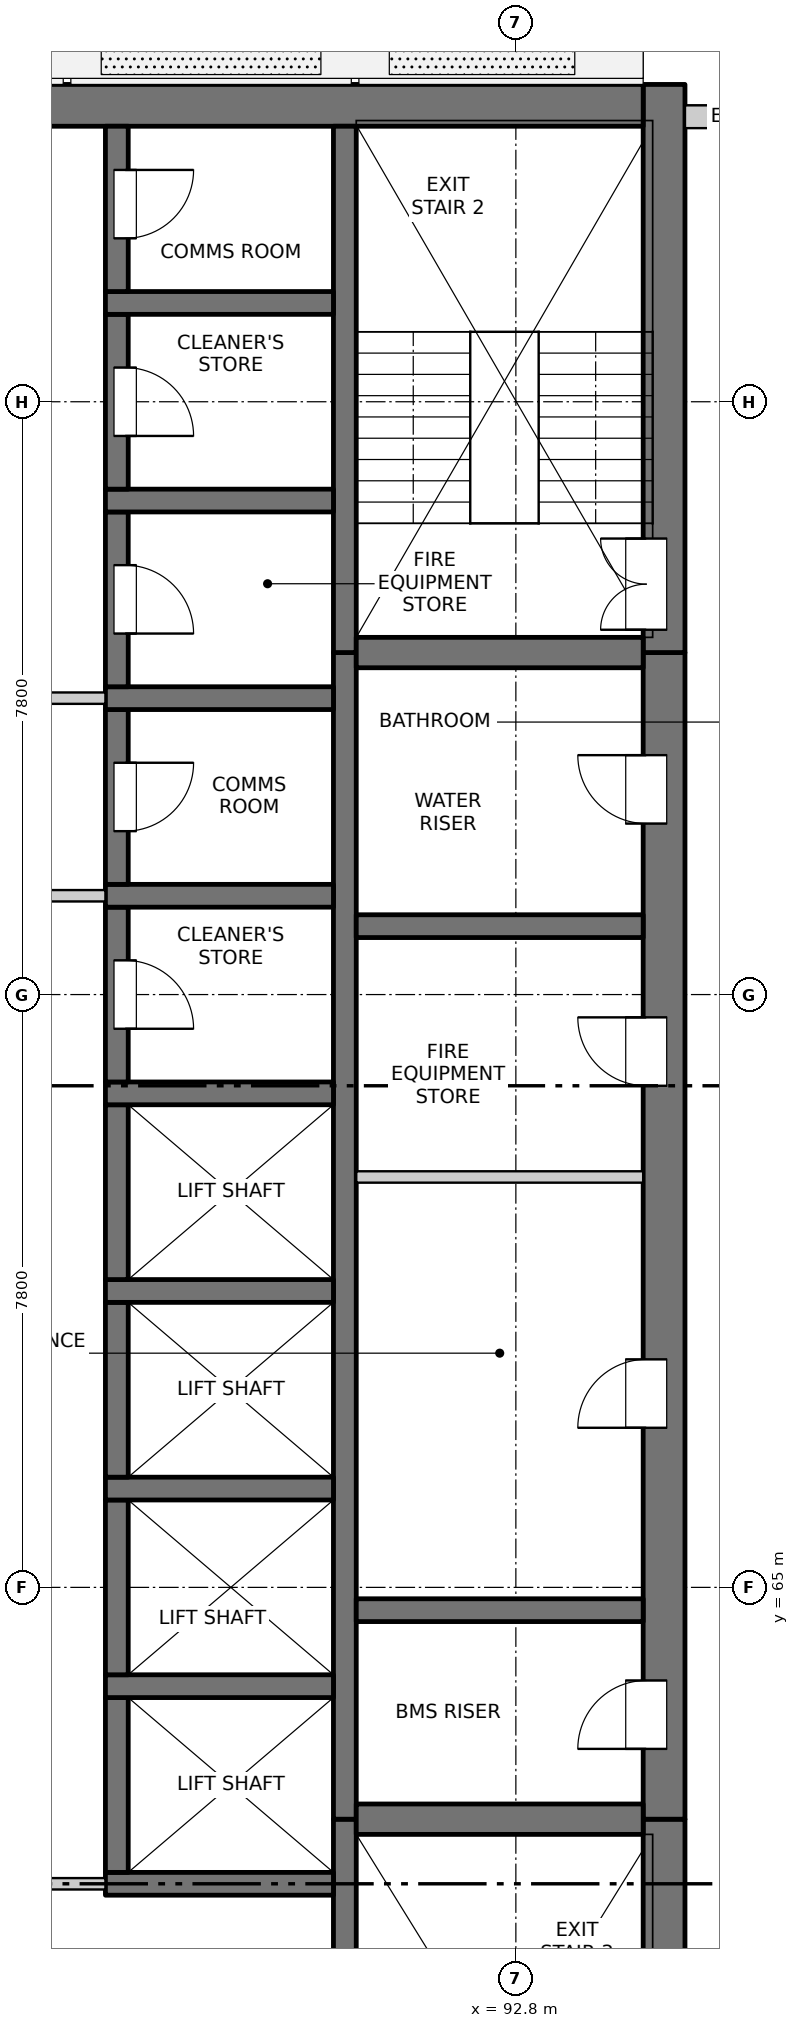
"""IFC4 building model, lengths in metres.
Left out: names, types, materials, properties, quantities, classifications, styles, units other than length and angle.
Written with IfcOpenShell. Run it as: python <this file> out.ifc"""

import sys

from ifc_helpers import new_model, si_unit, direction, frame, frame_2d, origin, place, context, subcontext, project, spatial, rectangle, extrude, element, fill, save


model = new_model("IFC4")
c1 = context("Model", 3, precision=1e-05, world=origin(), true_north=direction((0.0, 1.0)))
c2 = subcontext(c1, "Body", "Model", "MODEL_VIEW")
j1 = project(units=[si_unit("LENGTHUNIT", "METRE"), si_unit("PLANEANGLEUNIT", "RADIAN")], contexts=[c1])
p1 = place(None, origin())
s1 = spatial("IfcSite", under=j1, at=p1, CompositionType="ELEMENT")
p2 = place(p1, origin())
s2 = spatial("IfcBuilding", under=s1, at=p2, CompositionType="ELEMENT")
p3 = place(p2, frame((0.0, 0.0, 99.9)))
s3 = spatial("IfcBuildingStorey", under=s2, at=p3, CompositionType="ELEMENT", Elevation=99.9)
p4 = place(p3, frame((94.75, 54.975, -0.3), z_axis=(0.0, 0.0, 1.0), x_axis=(0.0, 1.0, 0.0)))
e1 = element("IfcWall", 1, at=p4, inside=s3, PredefinedType="SOLIDWALL", context=c2, shape_type="SweptSolid", body=[
    extrude(rectangle(XDim=6.975, YDim=0.55, at=frame_2d((3.487, 0.0))), origin(), (0.0, 0.0, 1.0), 3.45),
])
p5 = place(p4, frame((0.675, 0.0, 0.3)))
e2 = element("IfcOpeningElement", 2, at=p5, cuts=e1, PredefinedType="OPENING", context=c2, shape_type="SweptSolid", body=[
    extrude(rectangle(XDim=1.2, YDim=2.1, at=frame_2d((0.6, 1.05))), frame((0.0, 0.285, 0.0), z_axis=(0.0, -1.0, 0.0), x_axis=(1.0, 0.0, 0.0)), (0.0, 0.0, 1.0), 0.57),
])
p6 = place(p3, frame((94.75, 61.95, -0.3), z_axis=(0.0, 0.0, 1.0), x_axis=(0.0, 1.0, 0.0)))
e3 = element("IfcWall", 3, at=p6, inside=s3, PredefinedType="SOLIDWALL", context=c2, shape_type="SweptSolid", body=[
    extrude(rectangle(XDim=15.35, YDim=0.55, at=frame_2d((7.675, 0.0))), origin(), (0.0, 0.0, 1.0), 3.45),
])
p7 = place(p6, frame((0.925, 0.0, 0.3)))
e4 = element("IfcOpeningElement", 4, at=p7, cuts=e3, PredefinedType="OPENING", context=c2, shape_type="SweptSolid", body=[
    extrude(rectangle(XDim=0.9, YDim=2.1, at=frame_2d((0.45, 1.05))), frame((0.0, 0.285, 0.0), z_axis=(0.0, -1.0, 0.0), x_axis=(1.0, 0.0, 0.0)), (0.0, 0.0, 1.0), 0.57),
])
p8 = place(p6, frame((5.15, 0.0, 0.3)))
e5 = element("IfcOpeningElement", 5, at=p8, cuts=e3, PredefinedType="OPENING", context=c2, shape_type="SweptSolid", body=[
    extrude(rectangle(XDim=0.9, YDim=2.1, at=frame_2d((0.45, 1.05))), frame((0.0, 0.285, 0.0), z_axis=(0.0, -1.0, 0.0), x_axis=(1.0, 0.0, 0.0)), (0.0, 0.0, 1.0), 0.57),
])
p9 = place(p6, frame((9.65, 0.0, 0.3)))
e6 = element("IfcOpeningElement", 6, at=p9, cuts=e3, PredefinedType="OPENING", context=c2, shape_type="SweptSolid", body=[
    extrude(rectangle(XDim=0.9, YDim=2.1, at=frame_2d((0.45, 1.05))), frame((0.0, 0.285, 0.0), z_axis=(0.0, -1.0, 0.0), x_axis=(1.0, 0.0, 0.0)), (0.0, 0.0, 1.0), 0.57),
])
p10 = place(p6, frame((13.1, 0.0, 0.3)))
e7 = element("IfcOpeningElement", 7, at=p10, cuts=e3, PredefinedType="OPENING", context=c2, shape_type="SweptSolid", body=[
    extrude(rectangle(XDim=0.9, YDim=2.1, at=frame_2d((0.45, 1.05))), frame((0.0, 0.285, 0.0), z_axis=(0.0, -1.0, 0.0), x_axis=(1.0, 0.0, 0.0)), (0.0, 0.0, 1.0), 0.57),
])
p11 = place(p3, frame((94.75, 77.3, -0.3), z_axis=(0.0, 0.0, 1.0), x_axis=(0.0, 1.0, 0.0)))
e8 = element("IfcWall", 8, at=p11, inside=s3, PredefinedType="SOLIDWALL", context=c2, shape_type="SweptSolid", body=[
    extrude(rectangle(XDim=7.475, YDim=0.55, at=frame_2d((3.737, 0.0))), origin(), (0.0, 0.0, 1.0), 3.45),
])
p12 = place(p11, frame((0.3, 0.0, 0.3)))
e9 = element("IfcOpeningElement", 9, at=p12, cuts=e8, PredefinedType="OPENING", context=c2, shape_type="SweptSolid", body=[
    extrude(rectangle(XDim=1.2, YDim=2.1, at=frame_2d((0.6, 1.05))), frame((0.0, 0.285, 0.0), z_axis=(0.0, -1.0, 0.0), x_axis=(1.0, 0.0, 0.0)), (0.0, 0.0, 1.0), 0.57),
])
p13 = place(p3, frame((75.525, 84.5, -0.3), z_axis=(0.0, 0.0, 1.0), x_axis=(1.0, 0.0, 0.0)))
e10 = element("IfcWall", 10, at=p13, inside=s3, PredefinedType="SOLIDWALL", context=c2, shape_type="SweptSolid", body=[
    extrude(rectangle(XDim=18.95, YDim=0.55, at=frame_2d((9.475, 0.0))), origin(), (0.0, 0.0, 1.0), 3.45),
])
p14 = place(p3, frame((90.55, 55.525, -0.3), z_axis=(0.0, 0.0, 1.0), x_axis=(0.0, 1.0, 0.0)))
e11 = element("IfcWall", 11, at=p14, inside=s3, PredefinedType="SOLIDWALL", context=c2, shape_type="SweptSolid", body=[
    extrude(rectangle(XDim=6.425, YDim=0.3, at=frame_2d((3.212, 0.0))), origin(), (0.0, 0.0, 1.0), 3.45),
])
p15 = place(p14, frame((0.125, 0.0, 0.3)))
e12 = element("IfcOpeningElement", 12, at=p15, cuts=e11, PredefinedType="OPENING", context=c2, shape_type="SweptSolid", body=[
    extrude(rectangle(XDim=1.2, YDim=2.1, at=frame_2d((0.6, 1.05))), frame((0.0, 0.16, 0.0), z_axis=(0.0, -1.0, 0.0), x_axis=(1.0, 0.0, 0.0)), (0.0, 0.0, 1.0), 0.32),
])
p16 = place(p3, frame((90.55, 61.95, -0.3), z_axis=(0.0, 0.0, 1.0), x_axis=(0.0, 1.0, 0.0)))
e13 = element("IfcWall", 13, at=p16, inside=s3, PredefinedType="SOLIDWALL", context=c2, shape_type="SweptSolid", body=[
    extrude(rectangle(XDim=15.35, YDim=0.3, at=frame_2d((7.675, 0.0))), origin(), (0.0, 0.0, 1.0), 3.45),
])
p17 = place(p3, frame((90.55, 77.3, -0.3), z_axis=(0.0, 0.0, 1.0), x_axis=(0.0, 1.0, 0.0)))
e14 = element("IfcWall", 14, at=p17, inside=s3, PredefinedType="SOLIDWALL", context=c2, shape_type="SweptSolid", body=[
    extrude(rectangle(XDim=6.925, YDim=0.3, at=frame_2d((3.462, 0.0))), origin(), (0.0, 0.0, 1.0), 3.45),
])
p18 = place(p3, frame((87.4, 61.1, -0.3), z_axis=(0.0, 0.0, 1.0), x_axis=(1.0, 0.0, 0.0)))
e15 = element("IfcWall", 15, at=p18, inside=s3, PredefinedType="SOLIDWALL", context=c2, shape_type="SweptSolid", body=[
    extrude(rectangle(XDim=3.0, YDim=0.3, at=frame_2d((1.5, 0.0))), origin(), (0.0, 0.0, 1.0), 3.45),
])
p19 = place(p3, frame((87.55, 61.25, -0.3), z_axis=(0.0, 0.0, 1.0), x_axis=(0.0, 1.0, 0.0)))
e16 = element("IfcWall", 16, at=p19, inside=s3, PredefinedType="SOLIDWALL", context=c2, shape_type="SweptSolid", body=[
    extrude(rectangle(XDim=2.3, YDim=0.3, at=frame_2d((1.15, 0.0))), origin(), (0.0, 0.0, 1.0), 3.45),
])
p20 = place(p3, frame((87.4, 63.7, -0.3), z_axis=(0.0, 0.0, 1.0), x_axis=(1.0, 0.0, 0.0)))
e17 = element("IfcWall", 17, at=p20, inside=s3, PredefinedType="SOLIDWALL", context=c2, shape_type="SweptSolid", body=[
    extrude(rectangle(XDim=3.0, YDim=0.3, at=frame_2d((1.5, 0.0))), origin(), (0.0, 0.0, 1.0), 3.45),
])
p21 = place(p3, frame((87.55, 63.85, -0.3), z_axis=(0.0, 0.0, 1.0), x_axis=(0.0, 1.0, 0.0)))
e18 = element("IfcWall", 18, at=p21, inside=s3, PredefinedType="SOLIDWALL", context=c2, shape_type="SweptSolid", body=[
    extrude(rectangle(XDim=2.3, YDim=0.3, at=frame_2d((1.15, 0.0))), origin(), (0.0, 0.0, 1.0), 3.45),
])
p22 = place(p3, frame((87.4, 66.3, -0.3), z_axis=(0.0, 0.0, 1.0), x_axis=(1.0, 0.0, 0.0)))
e19 = element("IfcWall", 19, at=p22, inside=s3, PredefinedType="SOLIDWALL", context=c2, shape_type="SweptSolid", body=[
    extrude(rectangle(XDim=3.0, YDim=0.3, at=frame_2d((1.5, 0.0))), origin(), (0.0, 0.0, 1.0), 3.45),
])
p23 = place(p3, frame((87.55, 66.45, -0.3), z_axis=(0.0, 0.0, 1.0), x_axis=(0.0, 1.0, 0.0)))
e20 = element("IfcWall", 20, at=p23, inside=s3, PredefinedType="SOLIDWALL", context=c2, shape_type="SweptSolid", body=[
    extrude(rectangle(XDim=2.3, YDim=0.3, at=frame_2d((1.15, 0.0))), origin(), (0.0, 0.0, 1.0), 3.45),
])
p24 = place(p3, frame((87.4, 68.9, -0.3), z_axis=(0.0, 0.0, 1.0), x_axis=(1.0, 0.0, 0.0)))
e21 = element("IfcWall", 21, at=p24, inside=s3, PredefinedType="SOLIDWALL", context=c2, shape_type="SweptSolid", body=[
    extrude(rectangle(XDim=3.0, YDim=0.3, at=frame_2d((1.5, 0.0))), origin(), (0.0, 0.0, 1.0), 3.45),
])
p25 = place(p3, frame((87.55, 69.05, -0.3), z_axis=(0.0, 0.0, 1.0), x_axis=(0.0, 1.0, 0.0)))
e22 = element("IfcWall", 22, at=p25, inside=s3, PredefinedType="SOLIDWALL", context=c2, shape_type="SweptSolid", body=[
    extrude(rectangle(XDim=2.3, YDim=0.3, at=frame_2d((1.15, 0.0))), origin(), (0.0, 0.0, 1.0), 3.45),
])
p26 = place(p3, frame((87.4, 71.5, -0.3), z_axis=(0.0, 0.0, 1.0), x_axis=(1.0, 0.0, 0.0)))
e23 = element("IfcWall", 23, at=p26, inside=s3, PredefinedType="SOLIDWALL", context=c2, shape_type="SweptSolid", body=[
    extrude(rectangle(XDim=3.0, YDim=0.3, at=frame_2d((1.5, 0.0))), origin(), (0.0, 0.0, 1.0), 3.45),
])
p27 = place(p3, frame((87.55, 71.65, -0.3), z_axis=(0.0, 0.0, 1.0), x_axis=(0.0, 1.0, 0.0)))
e24 = element("IfcWall", 24, at=p27, inside=s3, PredefinedType="SOLIDWALL", context=c2, shape_type="SweptSolid", body=[
    extrude(rectangle(XDim=2.3, YDim=0.3, at=frame_2d((1.15, 0.0))), origin(), (0.0, 0.0, 1.0), 3.45),
])
p28 = place(p27, frame((0.7, 0.0, 0.3)))
e25 = element("IfcOpeningElement", 25, at=p28, cuts=e24, PredefinedType="OPENING", context=c2, shape_type="SweptSolid", body=[
    extrude(rectangle(XDim=0.9, YDim=2.1, at=frame_2d((0.45, 1.05))), frame((0.0, 0.16, 0.0), z_axis=(0.0, -1.0, 0.0), x_axis=(1.0, 0.0, 0.0)), (0.0, 0.0, 1.0), 0.32),
])
p29 = place(p3, frame((87.4, 74.1, -0.3), z_axis=(0.0, 0.0, 1.0), x_axis=(1.0, 0.0, 0.0)))
e26 = element("IfcWall", 26, at=p29, inside=s3, PredefinedType="SOLIDWALL", context=c2, shape_type="SweptSolid", body=[
    extrude(rectangle(XDim=3.0, YDim=0.3, at=frame_2d((1.5, 0.0))), origin(), (0.0, 0.0, 1.0), 3.45),
])
p30 = place(p3, frame((87.55, 74.25, -0.3), z_axis=(0.0, 0.0, 1.0), x_axis=(0.0, 1.0, 0.0)))
e27 = element("IfcWall", 27, at=p30, inside=s3, PredefinedType="SOLIDWALL", context=c2, shape_type="SweptSolid", body=[
    extrude(rectangle(XDim=2.3, YDim=0.3, at=frame_2d((1.15, 0.0))), origin(), (0.0, 0.0, 1.0), 3.45),
])
p31 = place(p30, frame((0.7, 0.0, 0.3)))
e28 = element("IfcOpeningElement", 28, at=p31, cuts=e27, PredefinedType="OPENING", context=c2, shape_type="SweptSolid", body=[
    extrude(rectangle(XDim=0.9, YDim=2.1, at=frame_2d((0.45, 1.05))), frame((0.0, 0.16, 0.0), z_axis=(0.0, -1.0, 0.0), x_axis=(1.0, 0.0, 0.0)), (0.0, 0.0, 1.0), 0.32),
])
p32 = place(p3, frame((87.4, 76.7, -0.3), z_axis=(0.0, 0.0, 1.0), x_axis=(1.0, 0.0, 0.0)))
e29 = element("IfcWall", 29, at=p32, inside=s3, PredefinedType="SOLIDWALL", context=c2, shape_type="SweptSolid", body=[
    extrude(rectangle(XDim=3.0, YDim=0.3, at=frame_2d((1.5, 0.0))), origin(), (0.0, 0.0, 1.0), 3.45),
])
p33 = place(p3, frame((87.55, 76.85, -0.3), z_axis=(0.0, 0.0, 1.0), x_axis=(0.0, 1.0, 0.0)))
e30 = element("IfcWall", 30, at=p33, inside=s3, PredefinedType="SOLIDWALL", context=c2, shape_type="SweptSolid", body=[
    extrude(rectangle(XDim=2.3, YDim=0.3, at=frame_2d((1.15, 0.0))), origin(), (0.0, 0.0, 1.0), 3.45),
])
p34 = place(p33, frame((0.7, 0.0, 0.3)))
e31 = element("IfcOpeningElement", 31, at=p34, cuts=e30, PredefinedType="OPENING", context=c2, shape_type="SweptSolid", body=[
    extrude(rectangle(XDim=0.9, YDim=2.1, at=frame_2d((0.45, 1.05))), frame((0.0, 0.16, 0.0), z_axis=(0.0, -1.0, 0.0), x_axis=(1.0, 0.0, 0.0)), (0.0, 0.0, 1.0), 0.32),
])
p35 = place(p3, frame((87.4, 79.3, -0.3), z_axis=(0.0, 0.0, 1.0), x_axis=(1.0, 0.0, 0.0)))
e32 = element("IfcWall", 32, at=p35, inside=s3, PredefinedType="SOLIDWALL", context=c2, shape_type="SweptSolid", body=[
    extrude(rectangle(XDim=3.0, YDim=0.3, at=frame_2d((1.5, 0.0))), origin(), (0.0, 0.0, 1.0), 3.45),
])
p36 = place(p3, frame((87.55, 79.45, -0.3), z_axis=(0.0, 0.0, 1.0), x_axis=(0.0, 1.0, 0.0)))
e33 = element("IfcWall", 33, at=p36, inside=s3, PredefinedType="SOLIDWALL", context=c2, shape_type="SweptSolid", body=[
    extrude(rectangle(XDim=2.3, YDim=0.3, at=frame_2d((1.15, 0.0))), origin(), (0.0, 0.0, 1.0), 3.45),
])
p37 = place(p36, frame((0.7, 0.0, 0.3)))
e34 = element("IfcOpeningElement", 34, at=p37, cuts=e33, PredefinedType="OPENING", context=c2, shape_type="SweptSolid", body=[
    extrude(rectangle(XDim=0.9, YDim=2.1, at=frame_2d((0.45, 1.05))), frame((0.0, 0.16, 0.0), z_axis=(0.0, -1.0, 0.0), x_axis=(1.0, 0.0, 0.0)), (0.0, 0.0, 1.0), 0.32),
])
p38 = place(p3, frame((87.4, 81.9, -0.3), z_axis=(0.0, 0.0, 1.0), x_axis=(1.0, 0.0, 0.0)))
e35 = element("IfcWall", 35, at=p38, inside=s3, PredefinedType="SOLIDWALL", context=c2, shape_type="SweptSolid", body=[
    extrude(rectangle(XDim=3.0, YDim=0.3, at=frame_2d((1.5, 0.0))), origin(), (0.0, 0.0, 1.0), 3.45),
])
p39 = place(p3, frame((87.55, 82.05, -0.3), z_axis=(0.0, 0.0, 1.0), x_axis=(0.0, 1.0, 0.0)))
e36 = element("IfcWall", 36, at=p39, inside=s3, PredefinedType="SOLIDWALL", context=c2, shape_type="SweptSolid", body=[
    extrude(rectangle(XDim=2.175, YDim=0.3, at=frame_2d((1.087, 0.0))), origin(), (0.0, 0.0, 1.0), 3.45),
])
p40 = place(p39, frame((0.7, 0.0, 0.3)))
e37 = element("IfcOpeningElement", 37, at=p40, cuts=e36, PredefinedType="OPENING", context=c2, shape_type="SweptSolid", body=[
    extrude(rectangle(XDim=0.9, YDim=2.1, at=frame_2d((0.45, 1.05))), frame((0.0, 0.16, 0.0), z_axis=(0.0, -1.0, 0.0), x_axis=(1.0, 0.0, 0.0)), (0.0, 0.0, 1.0), 0.32),
])
p41 = place(p3, frame((90.7, 61.95, -0.3), z_axis=(0.0, 0.0, 1.0), x_axis=(1.0, 0.0, 0.0)))
e38 = element("IfcWall", 38, at=p41, inside=s3, PredefinedType="SOLIDWALL", context=c2, shape_type="SweptSolid", body=[
    extrude(rectangle(XDim=3.775, YDim=0.4, at=frame_2d((1.888, 0.0))), origin(), (0.0, 0.0, 1.0), 3.45),
])
for number, where, z_axis, x_axis in (
    (39, (90.7, 64.7, -0.3), (0.0, 0.0, 1.0), (1.0, 0.0, 0.0)),
    (40, (90.7, 73.7, -0.3), (0.0, 0.0, 1.0), (1.0, 0.0, 0.0)),
):
    element("IfcWall", number, at=place(p3, frame(where, z_axis=z_axis, x_axis=x_axis)), inside=s3, PredefinedType="SOLIDWALL", context=c2, shape_type="SweptSolid", body=[
        extrude(rectangle(XDim=3.775, YDim=0.3, at=frame_2d((1.888, 0.0))), origin(), (0.0, 0.0, 1.0), 3.45),
    ])
p42 = place(p3, frame((90.7, 77.3, -0.3), z_axis=(0.0, 0.0, 1.0), x_axis=(1.0, 0.0, 0.0)))
e41 = element("IfcWall", 41, at=p42, inside=s3, PredefinedType="SOLIDWALL", context=c2, shape_type="SweptSolid", body=[
    extrude(rectangle(XDim=3.775, YDim=0.4, at=frame_2d((1.888, 0.0))), origin(), (0.0, 0.0, 1.0), 3.45),
])
p43 = place(p3, frame((95.025, 84.35, 0.0), z_axis=(0.0, 0.0, 1.0), x_axis=(1.0, 0.0, 0.0)))
e42 = element("IfcWall", 42, at=p43, inside=s3, PredefinedType="SOLIDWALL", context=c2, shape_type="SweptSolid", body=[
    extrude(rectangle(XDim=1.25, YDim=0.3, at=frame_2d((0.625, 0.0))), origin(), (0.0, 0.0, 1.0), 2.7),
])
p44 = place(p3, frame((82.6, 61.1, 0.0), z_axis=(0.0, 0.0, 1.0), x_axis=(1.0, 0.0, 0.0)))
e43 = element("IfcWall", 43, at=p44, inside=s3, PredefinedType="PARTITIONING", context=c2, shape_type="SweptSolid", body=[
    extrude(rectangle(XDim=4.8, YDim=0.15, at=frame_2d((2.4, 0.0))), origin(), (0.0, 0.0, 1.0), 3.15),
])
p45 = place(p44, frame((1.5, 0.0, 0.0)))
e44 = element("IfcOpeningElement", 44, at=p45, cuts=e43, PredefinedType="OPENING", context=c2, shape_type="SweptSolid", body=[
    extrude(rectangle(XDim=1.8, YDim=2.1, at=frame_2d((0.9, 1.05))), frame((0.0, 0.085, 0.0), z_axis=(0.0, -1.0, 0.0), x_axis=(1.0, 0.0, 0.0)), (0.0, 0.0, 1.0), 0.17),
])
p46 = place(p3, frame((90.7, 70.4, 0.0), z_axis=(0.0, 0.0, 1.0), x_axis=(1.0, 0.0, 0.0)))
e45 = element("IfcWall", 45, at=p46, inside=s3, PredefinedType="PARTITIONING", context=c2, shape_type="SweptSolid", body=[
    extrude(rectangle(XDim=3.775, YDim=0.15, at=frame_2d((1.887, 0.0))), origin(), (0.0, 0.0, 1.0), 3.15),
])
p47 = place(p3, frame((82.6, 74.1, 0.0), z_axis=(0.0, 0.0, 1.0), x_axis=(1.0, 0.0, 0.0)))
e46 = element("IfcWall", 46, at=p47, inside=s3, PredefinedType="PARTITIONING", context=c2, shape_type="SweptSolid", body=[
    extrude(rectangle(XDim=4.8, YDim=0.15, at=frame_2d((2.4, 0.0))), origin(), (0.0, 0.0, 1.0), 3.15),
])
p48 = place(p47, frame((1.5, 0.0, 0.0)))
e47 = element("IfcOpeningElement", 47, at=p48, cuts=e46, PredefinedType="OPENING", context=c2, shape_type="SweptSolid", body=[
    extrude(rectangle(XDim=1.8, YDim=2.1, at=frame_2d((0.9, 1.05))), frame((0.0, 0.085, 0.0), z_axis=(0.0, -1.0, 0.0), x_axis=(1.0, 0.0, 0.0)), (0.0, 0.0, 1.0), 0.17),
])
p49 = place(p3, frame((82.6, 76.7, 0.0), z_axis=(0.0, 0.0, 1.0), x_axis=(1.0, 0.0, 0.0)))
e48 = element("IfcWall", 48, at=p49, inside=s3, PredefinedType="PARTITIONING", context=c2, shape_type="SweptSolid", body=[
    extrude(rectangle(XDim=4.8, YDim=0.15, at=frame_2d((2.4, 0.0))), origin(), (0.0, 0.0, 1.0), 3.15),
])
p50 = place(p49, frame((1.5, 0.0, 0.0)))
e49 = element("IfcOpeningElement", 49, at=p50, cuts=e48, PredefinedType="OPENING", context=c2, shape_type="SweptSolid", body=[
    extrude(rectangle(XDim=1.8, YDim=2.1, at=frame_2d((0.9, 1.05))), frame((0.0, 0.085, 0.0), z_axis=(0.0, -1.0, 0.0), x_axis=(1.0, 0.0, 0.0)), (0.0, 0.0, 1.0), 0.17),
])
p51 = place(p7, origin())
e50 = element("IfcDoor", 50, at=p51, inside=s3, OperationType="SINGLE_SWING_LEFT", PredefinedType="DOOR", context=c2, shape_type="SweptSolid", body=[
    extrude(rectangle(XDim=0.9, YDim=2.1, at=frame_2d((0.45, 1.05))), frame((0.0, 0.26, 0.0), z_axis=(0.0, -1.0, 0.0), x_axis=(1.0, 0.0, 0.0)), (0.0, 0.0, 1.0), 0.05),
])
fill(e4, e50)
p52 = place(p8, origin())
e51 = element("IfcDoor", 51, at=p52, inside=s3, OperationType="SINGLE_SWING_LEFT", PredefinedType="DOOR", context=c2, shape_type="SweptSolid", body=[
    extrude(rectangle(XDim=0.9, YDim=2.1, at=frame_2d((0.45, 1.05))), frame((0.0, 0.26, 0.0), z_axis=(0.0, -1.0, 0.0), x_axis=(1.0, 0.0, 0.0)), (0.0, 0.0, 1.0), 0.05),
])
fill(e5, e51)
p53 = place(p9, origin())
e52 = element("IfcDoor", 52, at=p53, inside=s3, OperationType="SINGLE_SWING_RIGHT", PredefinedType="DOOR", context=c2, shape_type="SweptSolid", body=[
    extrude(rectangle(XDim=0.9, YDim=2.1, at=frame_2d((0.45, 1.05))), frame((0.0, 0.26, 0.0), z_axis=(0.0, -1.0, 0.0), x_axis=(1.0, 0.0, 0.0)), (0.0, 0.0, 1.0), 0.05),
])
fill(e6, e52)
p54 = place(p28, origin())
e53 = element("IfcDoor", 53, at=p54, inside=s3, OperationType="SINGLE_SWING_RIGHT", PredefinedType="DOOR", context=c2, shape_type="SweptSolid", body=[
    extrude(rectangle(XDim=0.9, YDim=2.1, at=frame_2d((0.45, 1.05))), frame((0.0, -0.085, 0.0), z_axis=(0.0, -1.0, 0.0), x_axis=(1.0, 0.0, 0.0)), (0.0, 0.0, 1.0), 0.05),
])
fill(e25, e53)
p55 = place(p31, origin())
e54 = element("IfcDoor", 54, at=p55, inside=s3, OperationType="SINGLE_SWING_LEFT", PredefinedType="DOOR", context=c2, shape_type="SweptSolid", body=[
    extrude(rectangle(XDim=0.9, YDim=2.1, at=frame_2d((0.45, 1.05))), frame((0.0, -0.085, 0.0), z_axis=(0.0, -1.0, 0.0), x_axis=(1.0, 0.0, 0.0)), (0.0, 0.0, 1.0), 0.05),
])
fill(e28, e54)
p56 = place(p10, origin())
e55 = element("IfcDoor", 55, at=p56, inside=s3, OperationType="SINGLE_SWING_RIGHT", PredefinedType="DOOR", context=c2, shape_type="SweptSolid", body=[
    extrude(rectangle(XDim=0.9, YDim=2.1, at=frame_2d((0.45, 1.05))), frame((0.0, 0.26, 0.0), z_axis=(0.0, -1.0, 0.0), x_axis=(1.0, 0.0, 0.0)), (0.0, 0.0, 1.0), 0.05),
])
fill(e7, e55)
p57 = place(p34, origin())
e56 = element("IfcDoor", 56, at=p57, inside=s3, OperationType="SINGLE_SWING_RIGHT", PredefinedType="DOOR", context=c2, shape_type="SweptSolid", body=[
    extrude(rectangle(XDim=0.9, YDim=2.1, at=frame_2d((0.45, 1.05))), frame((0.0, -0.085, 0.0), z_axis=(0.0, -1.0, 0.0), x_axis=(1.0, 0.0, 0.0)), (0.0, 0.0, 1.0), 0.05),
])
fill(e31, e56)
p58 = place(p12, origin())
e57 = element("IfcDoor", 57, at=p58, inside=s3, OperationType="DOUBLE_DOOR_SINGLE_SWING", PredefinedType="DOOR", context=c2, shape_type="SweptSolid", body=[
    extrude(rectangle(XDim=1.2, YDim=2.1, at=frame_2d((0.6, 1.05))), frame((0.0, 0.26, 0.0), z_axis=(0.0, -1.0, 0.0), x_axis=(1.0, 0.0, 0.0)), (0.0, 0.0, 1.0), 0.05),
])
fill(e9, e57)
p59 = place(p37, origin())
e58 = element("IfcDoor", 58, at=p59, inside=s3, OperationType="SINGLE_SWING_RIGHT", PredefinedType="DOOR", context=c2, shape_type="SweptSolid", body=[
    extrude(rectangle(XDim=0.9, YDim=2.1, at=frame_2d((0.45, 1.05))), frame((0.0, -0.085, 0.0), z_axis=(0.0, -1.0, 0.0), x_axis=(1.0, 0.0, 0.0)), (0.0, 0.0, 1.0), 0.05),
])
fill(e34, e58)
p60 = place(p40, origin())
e59 = element("IfcDoor", 59, at=p60, inside=s3, OperationType="SINGLE_SWING_LEFT", PredefinedType="DOOR", context=c2, shape_type="SweptSolid", body=[
    extrude(rectangle(XDim=0.9, YDim=2.1, at=frame_2d((0.45, 1.05))), frame((0.0, -0.085, 0.0), z_axis=(0.0, -1.0, 0.0), x_axis=(1.0, 0.0, 0.0)), (0.0, 0.0, 1.0), 0.05),
])
fill(e37, e59)
save(model, sys.argv[1])
